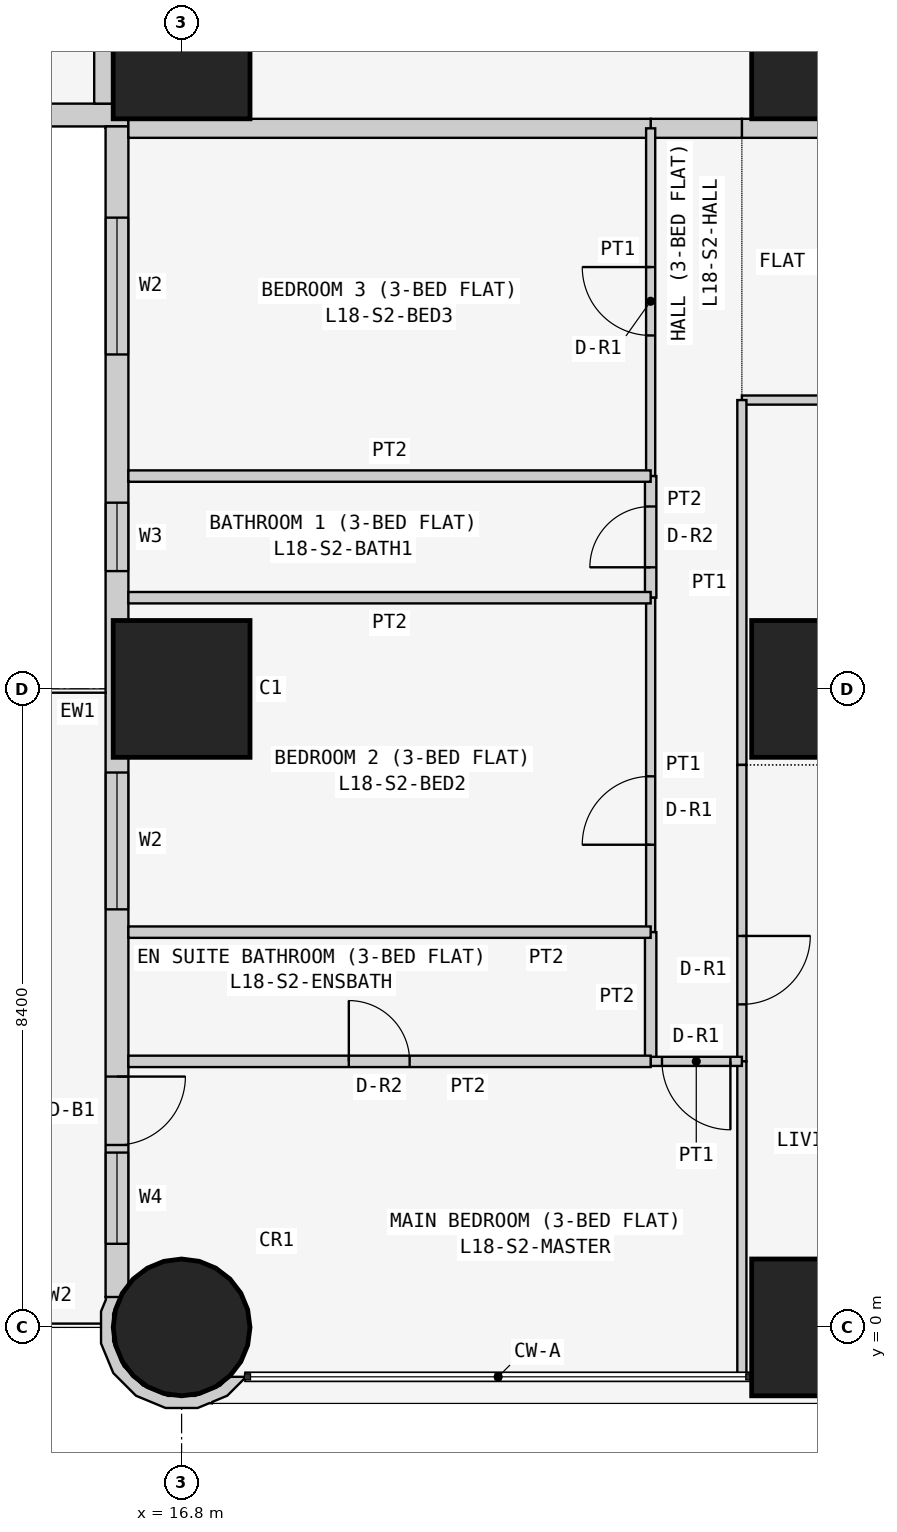
"""IFC4 building model, lengths in metres.
Left out: names, types, materials, properties, quantities, classifications, styles, units other than length and angle.
Written with IfcOpenShell. Run it as: python <this file> out.ifc"""

import sys

from ifc_helpers import new_model, si_unit, direction, frame, frame_2d, origin, origin_2d, place, context, subcontext, project, spatial, polyline, rectangle, circle, outline, extrude, element, fill, save


model = new_model("IFC4")
c1 = context("Model", 3, precision=1e-05, world=origin(), true_north=direction((0.0, 1.0)))
c2 = subcontext(c1, "Body", "Model", "MODEL_VIEW")
j1 = project(units=[si_unit("LENGTHUNIT", "METRE"), si_unit("PLANEANGLEUNIT", "RADIAN")], contexts=[c1])
p1 = place(None, origin())
s1 = spatial("IfcSite", under=j1, at=p1, CompositionType="ELEMENT")
p2 = place(p1, origin())
s2 = spatial("IfcBuilding", under=s1, at=p2, CompositionType="ELEMENT")
p3 = place(p2, frame((0.0, 0.0, 74.1)))
s3 = spatial("IfcBuildingStorey", under=s2, at=p3, CompositionType="ELEMENT", Elevation=74.1)
p4 = place(p3, frame((16.8, 0.0, 0.0), z_axis=(0.0, 0.0, 1.0), x_axis=(1.0, 0.0, 0.0)))
e1 = element("IfcColumn", 1, at=p4, inside=s3, PredefinedType="COLUMN", context=c2, shape_type="SweptSolid", body=[
    extrude(circle(Radius=0.9, at=origin_2d()), origin(), (0.0, 0.0, 1.0), 3.6),
])
for number, where, z_axis, x_axis in (
    (2, (16.8, 8.4, 0.0), (0.0, 0.0, 1.0), (1.0, 0.0, 0.0)),
    (3, (16.8, 16.8, 0.0), (0.0, 0.0, 1.0), (1.0, 0.0, 0.0)),
    (4, (25.2, 0.0, 0.0), (0.0, 0.0, 1.0), (1.0, 0.0, 0.0)),
    (5, (25.2, 8.4, 0.0), (0.0, 0.0, 1.0), (1.0, 0.0, 0.0)),
    (6, (25.2, 16.8, 0.0), (0.0, 0.0, 1.0), (1.0, 0.0, 0.0)),
):
    element("IfcColumn", number, at=place(p3, frame(where, z_axis=z_axis, x_axis=x_axis)), inside=s3, PredefinedType="COLUMN", context=c2, shape_type="SweptSolid", body=[
        extrude(rectangle(XDim=1.8, YDim=1.8, at=origin_2d()), origin(), (0.0, 0.0, 1.0), 3.6),
    ])
p5 = place(p3, frame((0.4, 15.95, 0.0), z_axis=(0.0, 0.0, 1.0), x_axis=(1.0, 0.0, 0.0)))
e7 = element("IfcWall", 7, at=p5, inside=s3, PredefinedType="SOLIDWALL", context=c2, shape_type="SweptSolid", body=[
    extrude(rectangle(XDim=15.7, YDim=0.3, at=frame_2d((7.85, 0.0))), origin(), (0.0, 0.0, 1.0), 3.45),
])
p6 = place(p5, frame((12.4, 0.0, 0.9)))
e8 = element("IfcOpeningElement", 8, at=p6, cuts=e7, PredefinedType="OPENING", context=c2, shape_type="SweptSolid", body=[
    extrude(rectangle(XDim=1.8, YDim=1.5, at=frame_2d((0.9, 0.75))), frame((0.0, 0.16, 0.0), z_axis=(0.0, -1.0, 0.0), x_axis=(1.0, 0.0, 0.0)), (0.0, 0.0, 1.0), 0.32),
])
p7 = place(p5, frame((9.55, 0.0, 1.5)))
e9 = element("IfcOpeningElement", 9, at=p7, cuts=e7, PredefinedType="OPENING", context=c2, shape_type="SweptSolid", body=[
    extrude(rectangle(XDim=0.9, YDim=0.7, at=frame_2d((0.45, 0.35))), frame((0.0, 0.16, 0.0), z_axis=(0.0, -1.0, 0.0), x_axis=(1.0, 0.0, 0.0)), (0.0, 0.0, 1.0), 0.32),
])
p8 = place(p5, frame((5.1, 0.0, 0.9)))
e10 = element("IfcOpeningElement", 10, at=p8, cuts=e7, PredefinedType="OPENING", context=c2, shape_type="SweptSolid", body=[
    extrude(rectangle(XDim=1.8, YDim=1.5, at=frame_2d((0.9, 0.75))), frame((0.0, 0.16, 0.0), z_axis=(0.0, -1.0, 0.0), x_axis=(1.0, 0.0, 0.0)), (0.0, 0.0, 1.0), 0.32),
])
p9 = place(p5, frame((2.0, 0.0, 0.0)))
e11 = element("IfcOpeningElement", 11, at=p9, cuts=e7, PredefinedType="OPENING", context=c2, shape_type="SweptSolid", body=[
    extrude(rectangle(XDim=0.9, YDim=2.4, at=frame_2d((0.45, 1.2))), frame((0.0, 0.16, 0.0), z_axis=(0.0, -1.0, 0.0), x_axis=(1.0, 0.0, 0.0)), (0.0, 0.0, 1.0), 0.32),
])
p10 = place(p5, frame((0.7, 0.0, 0.9)))
e12 = element("IfcOpeningElement", 12, at=p10, cuts=e7, PredefinedType="OPENING", context=c2, shape_type="SweptSolid", body=[
    extrude(rectangle(XDim=1.2, YDim=1.5, at=frame_2d((0.6, 0.75))), frame((0.0, 0.16, 0.0), z_axis=(0.0, -1.0, 0.0), x_axis=(1.0, 0.0, 0.0)), (0.0, 0.0, 1.0), 0.32),
])
p11 = place(p3, frame((15.95, 15.8, 0.0), z_axis=(0.0, 0.0, 1.0), x_axis=(0.0, -1.0, 0.0)))
e13 = element("IfcWall", 13, at=p11, inside=s3, PredefinedType="SOLIDWALL", context=c2, shape_type="SweptSolid", body=[
    extrude(rectangle(XDim=15.4, YDim=0.3, at=frame_2d((7.7, 0.0))), origin(), (0.0, 0.0, 1.0), 3.45),
])
p12 = place(p11, frame((1.2, 0.0, 0.9)))
e14 = element("IfcOpeningElement", 14, at=p12, cuts=e13, PredefinedType="OPENING", context=c2, shape_type="SweptSolid", body=[
    extrude(rectangle(XDim=1.8, YDim=1.5, at=frame_2d((0.9, 0.75))), frame((0.0, 0.16, 0.0), z_axis=(0.0, -1.0, 0.0), x_axis=(1.0, 0.0, 0.0)), (0.0, 0.0, 1.0), 0.32),
])
p13 = place(p11, frame((4.95, 0.0, 1.5)))
e15 = element("IfcOpeningElement", 15, at=p13, cuts=e13, PredefinedType="OPENING", context=c2, shape_type="SweptSolid", body=[
    extrude(rectangle(XDim=0.9, YDim=0.7, at=frame_2d((0.45, 0.35))), frame((0.0, 0.16, 0.0), z_axis=(0.0, -1.0, 0.0), x_axis=(1.0, 0.0, 0.0)), (0.0, 0.0, 1.0), 0.32),
])
p14 = place(p11, frame((8.5, 0.0, 0.9)))
e16 = element("IfcOpeningElement", 16, at=p14, cuts=e13, PredefinedType="OPENING", context=c2, shape_type="SweptSolid", body=[
    extrude(rectangle(XDim=1.8, YDim=1.5, at=frame_2d((0.9, 0.75))), frame((0.0, 0.16, 0.0), z_axis=(0.0, -1.0, 0.0), x_axis=(1.0, 0.0, 0.0)), (0.0, 0.0, 1.0), 0.32),
])
p15 = place(p11, frame((12.5, 0.0, 0.0)))
e17 = element("IfcOpeningElement", 17, at=p15, cuts=e13, PredefinedType="OPENING", context=c2, shape_type="SweptSolid", body=[
    extrude(rectangle(XDim=0.9, YDim=2.4, at=frame_2d((0.45, 1.2))), frame((0.0, 0.16, 0.0), z_axis=(0.0, -1.0, 0.0), x_axis=(1.0, 0.0, 0.0)), (0.0, 0.0, 1.0), 0.32),
])
p16 = place(p11, frame((13.5, 0.0, 0.9)))
e18 = element("IfcOpeningElement", 18, at=p16, cuts=e13, PredefinedType="OPENING", context=c2, shape_type="SweptSolid", body=[
    extrude(rectangle(XDim=1.2, YDim=1.5, at=frame_2d((0.6, 0.75))), frame((0.0, 0.16, 0.0), z_axis=(0.0, -1.0, 0.0), x_axis=(1.0, 0.0, 0.0)), (0.0, 0.0, 1.0), 0.32),
])
p17 = place(p3, frame((15.89, 0.364, 0.0), z_axis=(0.0, 0.0, 1.0), x_axis=(-0.377204953059, -0.926129809145, 0.0)))
e19 = element("IfcWall", 19, at=p17, inside=s3, PredefinedType="SOLIDWALL", context=c2, shape_type="SweptSolid", body=[
    extrude(outline(polyline([(0.36, 1.803), (0.509, 1.741), (0.761, 1.486), (0.896, 1.154), (0.894, 0.795), (0.755, 0.465), (0.5, 0.213), (0.168, 0.078), (-0.1, 0.08), (0.001, -0.097), (0.03, -0.08), (0.199, -0.081), (0.589, 0.078), (0.889, 0.374), (1.053, 0.763), (1.055, 1.185), (0.896, 1.575), (0.778, 1.695), (0.769, 1.728), (0.75, 1.723), (0.6, 1.875), (0.295, 2.004), (0.281, 1.998), (0.36, 1.803)])), origin(), (0.0, 0.0, 1.0), 3.45),
])
p18 = place(p3, frame((29.4, 15.775, 0.0), z_axis=(0.0, 0.0, 1.0), x_axis=(-1.0, 0.0, 0.0)))
e20 = element("IfcWall", 20, at=p18, inside=s3, PredefinedType="PARTITIONING", context=c2, shape_type="SweptSolid", body=[
    extrude(rectangle(XDim=5.229, YDim=0.25, at=frame_2d((2.615, 0.0))), origin(), (0.0, 0.0, 1.0), 3.45),
])
p19 = place(p18, frame((2.1, 0.0, 0.0)))
e21 = element("IfcOpeningElement", 21, at=p19, cuts=e20, PredefinedType="OPENING", context=c2, shape_type="SweptSolid", body=[
    extrude(rectangle(XDim=1.0, YDim=2.1, at=frame_2d((0.5, 1.05))), frame((0.0, 0.135, 0.0), z_axis=(0.0, -1.0, 0.0), x_axis=(1.0, 0.0, 0.0)), (0.0, 0.0, 1.0), 0.27),
])
p20 = place(p3, frame((24.171, 15.775, 0.0), z_axis=(0.0, 0.0, 1.0), x_axis=(-1.0, 0.0, 0.0)))
e22 = element("IfcWall", 22, at=p20, inside=s3, PredefinedType="PARTITIONING", context=c2, shape_type="SweptSolid", body=[
    extrude(rectangle(XDim=1.2, YDim=0.25, at=frame_2d((0.6, 0.0))), origin(), (0.0, 0.0, 1.0), 3.45),
])
p21 = place(p3, frame((22.971, 15.775, 0.0), z_axis=(0.0, 0.0, 1.0), x_axis=(-1.0, 0.0, 0.0)))
e23 = element("IfcWall", 23, at=p21, inside=s3, PredefinedType="PARTITIONING", context=c2, shape_type="SweptSolid", body=[
    extrude(rectangle(XDim=6.871, YDim=0.25, at=frame_2d((3.436, 0.0))), origin(), (0.0, 0.0, 1.0), 3.45),
])
p22 = place(p3, frame((15.775, 16.1, 0.0), z_axis=(0.0, 0.0, 1.0), x_axis=(0.0, 1.0, 0.0)))
e24 = element("IfcWall", 24, at=p22, inside=s3, PredefinedType="PARTITIONING", context=c2, shape_type="SweptSolid", body=[
    extrude(rectangle(XDim=6.471, YDim=0.25, at=frame_2d((3.235, 0.0))), origin(), (0.0, 0.0, 1.0), 3.45),
])
p23 = place(p3, frame((29.4, 12.2, 0.0), z_axis=(0.0, 0.0, 1.0), x_axis=(-1.0, 0.0, 0.0)))
e25 = element("IfcWall", 25, at=p23, inside=s3, PredefinedType="PARTITIONING", context=c2, shape_type="SweptSolid", body=[
    extrude(rectangle(XDim=5.229, YDim=0.12, at=frame_2d((2.615, 0.0))), origin(), (0.0, 0.0, 1.0), 3.45),
])
p24 = place(p23, frame((1.05, 0.0, 0.0)))
e26 = element("IfcOpeningElement", 26, at=p24, cuts=e25, PredefinedType="OPENING", context=c2, shape_type="SweptSolid", body=[
    extrude(rectangle(XDim=0.9, YDim=2.1, at=frame_2d((0.45, 1.05))), frame((0.0, 0.07, 0.0), z_axis=(0.0, -1.0, 0.0), x_axis=(1.0, 0.0, 0.0)), (0.0, 0.0, 1.0), 0.14),
])
p25 = place(p3, frame((24.171, 7.4, 0.0), z_axis=(0.0, 0.0, 1.0), x_axis=(0.0, 1.0, 0.0)))
e27 = element("IfcWall", 27, at=p25, inside=s3, PredefinedType="PARTITIONING", context=c2, shape_type="SweptSolid", body=[
    extrude(rectangle(XDim=4.8, YDim=0.12, at=frame_2d((2.4, 0.0))), origin(), (0.0, 0.0, 1.0), 3.45),
])
p26 = place(p3, frame((24.171, 3.5, 0.0), z_axis=(0.0, 0.0, 1.0), x_axis=(0.0, 1.0, 0.0)))
e28 = element("IfcWall", 28, at=p26, inside=s3, PredefinedType="PARTITIONING", context=c2, shape_type="SweptSolid", body=[
    extrude(rectangle(XDim=3.9, YDim=0.12, at=frame_2d((1.95, 0.0))), origin(), (0.0, 0.0, 1.0), 3.45),
])
p27 = place(p26, frame((0.75, 0.0, 0.0)))
e29 = element("IfcOpeningElement", 29, at=p27, cuts=e28, PredefinedType="OPENING", context=c2, shape_type="SweptSolid", body=[
    extrude(rectangle(XDim=0.9, YDim=2.1, at=frame_2d((0.45, 1.05))), frame((0.0, 0.07, 0.0), z_axis=(0.0, -1.0, 0.0), x_axis=(1.0, 0.0, 0.0)), (0.0, 0.0, 1.0), 0.14),
])
p28 = place(p3, frame((24.171, -0.65, 0.0), z_axis=(0.0, 0.0, 1.0), x_axis=(0.0, 1.0, 0.0)))
e30 = element("IfcWall", 30, at=p28, inside=s3, PredefinedType="PARTITIONING", context=c2, shape_type="SweptSolid", body=[
    extrude(rectangle(XDim=4.15, YDim=0.12, at=frame_2d((2.075, 0.0))), origin(), (0.0, 0.0, 1.0), 3.45),
])
p29 = place(p3, frame((22.971, 11.2, 0.0), z_axis=(0.0, 0.0, 1.0), x_axis=(0.0, 1.0, 0.0)))
e31 = element("IfcWall", 31, at=p29, inside=s3, PredefinedType="PARTITIONING", context=c2, shape_type="SweptSolid", body=[
    extrude(rectangle(XDim=4.575, YDim=0.12, at=frame_2d((2.288, 0.0))), origin(), (0.0, 0.0, 1.0), 3.45),
])
p30 = place(p29, frame((1.85, 0.0, 0.0)))
e32 = element("IfcOpeningElement", 32, at=p30, cuts=e31, PredefinedType="OPENING", context=c2, shape_type="SweptSolid", body=[
    extrude(rectangle(XDim=0.9, YDim=2.1, at=frame_2d((0.45, 1.05))), frame((0.0, 0.07, 0.0), z_axis=(0.0, -1.0, 0.0), x_axis=(1.0, 0.0, 0.0)), (0.0, 0.0, 1.0), 0.14),
])
p31 = place(p3, frame((22.971, 9.6, 0.0), z_axis=(0.0, 0.0, 1.0), x_axis=(0.0, 1.0, 0.0)))
e33 = element("IfcWall", 33, at=p31, inside=s3, PredefinedType="PARTITIONING", context=c2, shape_type="SweptSolid", body=[
    extrude(rectangle(XDim=1.6, YDim=0.15, at=frame_2d((0.8, 0.0))), origin(), (0.0, 0.0, 1.0), 3.45),
])
p32 = place(p31, frame((0.4, 0.0, 0.0)))
e34 = element("IfcOpeningElement", 34, at=p32, cuts=e33, PredefinedType="OPENING", context=c2, shape_type="SweptSolid", body=[
    extrude(rectangle(XDim=0.8, YDim=2.1, at=frame_2d((0.4, 1.05))), frame((0.0, 0.085, 0.0), z_axis=(0.0, -1.0, 0.0), x_axis=(1.0, 0.0, 0.0)), (0.0, 0.0, 1.0), 0.17),
])
p33 = place(p3, frame((22.971, 5.2, 0.0), z_axis=(0.0, 0.0, 1.0), x_axis=(0.0, 1.0, 0.0)))
e35 = element("IfcWall", 35, at=p33, inside=s3, PredefinedType="PARTITIONING", context=c2, shape_type="SweptSolid", body=[
    extrude(rectangle(XDim=4.4, YDim=0.12, at=frame_2d((2.2, 0.0))), origin(), (0.0, 0.0, 1.0), 3.45),
])
p34 = place(p33, frame((1.15, 0.0, 0.0)))
e36 = element("IfcOpeningElement", 36, at=p34, cuts=e35, PredefinedType="OPENING", context=c2, shape_type="SweptSolid", body=[
    extrude(rectangle(XDim=0.9, YDim=2.1, at=frame_2d((0.45, 1.05))), frame((0.0, 0.07, 0.0), z_axis=(0.0, -1.0, 0.0), x_axis=(1.0, 0.0, 0.0)), (0.0, 0.0, 1.0), 0.14),
])
p35 = place(p3, frame((22.971, 3.5, 0.0), z_axis=(0.0, 0.0, 1.0), x_axis=(0.0, 1.0, 0.0)))
e37 = element("IfcWall", 37, at=p35, inside=s3, PredefinedType="PARTITIONING", context=c2, shape_type="SweptSolid", body=[
    extrude(rectangle(XDim=1.7, YDim=0.15, at=frame_2d((0.85, 0.0))), origin(), (0.0, 0.0, 1.0), 3.45),
])
p36 = place(p3, frame((24.171, 3.5, 0.0), z_axis=(0.0, 0.0, 1.0), x_axis=(-1.0, 0.0, 0.0)))
e38 = element("IfcWall", 38, at=p36, inside=s3, PredefinedType="PARTITIONING", context=c2, shape_type="SweptSolid", body=[
    extrude(rectangle(XDim=1.2, YDim=0.12, at=frame_2d((0.6, 0.0))), origin(), (0.0, 0.0, 1.0), 3.45),
])
p37 = place(p36, frame((0.151, 0.0, 0.0)))
e39 = element("IfcOpeningElement", 39, at=p37, cuts=e38, PredefinedType="OPENING", context=c2, shape_type="SweptSolid", body=[
    extrude(rectangle(XDim=0.9, YDim=2.1, at=frame_2d((0.45, 1.05))), frame((0.0, 0.07, 0.0), z_axis=(0.0, -1.0, 0.0), x_axis=(1.0, 0.0, 0.0)), (0.0, 0.0, 1.0), 0.14),
])
for number, where, z_axis, x_axis in (
    (40, (22.971, 11.2, 0.0), (0.0, 0.0, 1.0), (-1.0, 0.0, 0.0)),
    (41, (22.971, 9.6, 0.0), (0.0, 0.0, 1.0), (-1.0, 0.0, 0.0)),
    (42, (22.971, 5.2, 0.0), (0.0, 0.0, 1.0), (-1.0, 0.0, 0.0)),
):
    element("IfcWall", number, at=place(p3, frame(where, z_axis=z_axis, x_axis=x_axis)), inside=s3, PredefinedType="PARTITIONING", context=c2, shape_type="SweptSolid", body=[
        extrude(rectangle(XDim=6.871, YDim=0.15, at=frame_2d((3.436, 0.0))), origin(), (0.0, 0.0, 1.0), 3.45),
    ])
p38 = place(p3, frame((22.971, 3.5, 0.0), z_axis=(0.0, 0.0, 1.0), x_axis=(-1.0, 0.0, 0.0)))
e43 = element("IfcWall", 43, at=p38, inside=s3, PredefinedType="PARTITIONING", context=c2, shape_type="SweptSolid", body=[
    extrude(rectangle(XDim=6.871, YDim=0.15, at=frame_2d((3.436, 0.0))), origin(), (0.0, 0.0, 1.0), 3.45),
])
p39 = place(p38, frame((3.171, 0.0, 0.0)))
e44 = element("IfcOpeningElement", 44, at=p39, cuts=e43, PredefinedType="OPENING", context=c2, shape_type="SweptSolid", body=[
    extrude(rectangle(XDim=0.8, YDim=2.1, at=frame_2d((0.4, 1.05))), frame((0.0, 0.085, 0.0), z_axis=(0.0, -1.0, 0.0), x_axis=(1.0, 0.0, 0.0)), (0.0, 0.0, 1.0), 0.17),
])
p40 = place(p12, origin())
e45 = element("IfcWindow", 45, at=p40, inside=s3, PartitioningType="SINGLE_PANEL", PredefinedType="WINDOW", context=c2, shape_type="SweptSolid", body=[
    extrude(rectangle(XDim=1.8, YDim=1.5, at=frame_2d((0.9, 0.75))), frame((0.0, 0.03, 0.0), z_axis=(0.0, -1.0, 0.0), x_axis=(1.0, 0.0, 0.0)), (0.0, 0.0, 1.0), 0.06),
])
fill(e14, e45)
p41 = place(p13, origin())
e46 = element("IfcWindow", 46, at=p41, inside=s3, PartitioningType="SINGLE_PANEL", PredefinedType="WINDOW", context=c2, shape_type="SweptSolid", body=[
    extrude(rectangle(XDim=0.9, YDim=0.7, at=frame_2d((0.45, 0.35))), frame((0.0, 0.03, 0.0), z_axis=(0.0, -1.0, 0.0), x_axis=(1.0, 0.0, 0.0)), (0.0, 0.0, 1.0), 0.06),
])
fill(e15, e46)
p42 = place(p14, origin())
e47 = element("IfcWindow", 47, at=p42, inside=s3, PartitioningType="SINGLE_PANEL", PredefinedType="WINDOW", context=c2, shape_type="SweptSolid", body=[
    extrude(rectangle(XDim=1.8, YDim=1.5, at=frame_2d((0.9, 0.75))), frame((0.0, 0.03, 0.0), z_axis=(0.0, -1.0, 0.0), x_axis=(1.0, 0.0, 0.0)), (0.0, 0.0, 1.0), 0.06),
])
fill(e16, e47)
p43 = place(p15, origin())
e48 = element("IfcDoor", 48, at=p43, inside=s3, OperationType="SINGLE_SWING_LEFT", PredefinedType="DOOR", context=c2, shape_type="SweptSolid", body=[
    extrude(rectangle(XDim=0.9, YDim=2.4, at=frame_2d((0.45, 1.2))), frame((0.0, 0.025, 0.0), z_axis=(0.0, -1.0, 0.0), x_axis=(1.0, 0.0, 0.0)), (0.0, 0.0, 1.0), 0.05),
])
fill(e17, e48)
p44 = place(p16, origin())
e49 = element("IfcWindow", 49, at=p44, inside=s3, PartitioningType="SINGLE_PANEL", PredefinedType="WINDOW", context=c2, shape_type="SweptSolid", body=[
    extrude(rectangle(XDim=1.2, YDim=1.5, at=frame_2d((0.6, 0.75))), frame((0.0, 0.03, 0.0), z_axis=(0.0, -1.0, 0.0), x_axis=(1.0, 0.0, 0.0)), (0.0, 0.0, 1.0), 0.06),
])
fill(e18, e49)
p45 = place(p27, frame((0.9, 0.0, 0.0), z_axis=(0.0, 0.0, 1.0), x_axis=(-1.0, 0.0, 0.0)))
e50 = element("IfcDoor", 50, at=p45, inside=s3, OperationType="SINGLE_SWING_LEFT", PredefinedType="DOOR", context=c2, shape_type="SweptSolid", body=[
    extrude(rectangle(XDim=0.9, YDim=2.1, at=frame_2d((0.45, 1.05))), frame((0.0, 0.025, 0.0), z_axis=(0.0, -1.0, 0.0), x_axis=(1.0, 0.0, 0.0)), (0.0, 0.0, 1.0), 0.05),
])
fill(e29, e50)
p46 = place(p30, origin())
e51 = element("IfcDoor", 51, at=p46, inside=s3, OperationType="SINGLE_SWING_RIGHT", PredefinedType="DOOR", context=c2, shape_type="SweptSolid", body=[
    extrude(rectangle(XDim=0.9, YDim=2.1, at=frame_2d((0.45, 1.05))), frame((0.0, 0.025, 0.0), z_axis=(0.0, -1.0, 0.0), x_axis=(1.0, 0.0, 0.0)), (0.0, 0.0, 1.0), 0.05),
])
fill(e32, e51)
p47 = place(p32, origin())
e52 = element("IfcDoor", 52, at=p47, inside=s3, OperationType="SINGLE_SWING_LEFT", PredefinedType="DOOR", context=c2, shape_type="SweptSolid", body=[
    extrude(rectangle(XDim=0.8, YDim=2.1, at=frame_2d((0.4, 1.05))), frame((0.0, 0.025, 0.0), z_axis=(0.0, -1.0, 0.0), x_axis=(1.0, 0.0, 0.0)), (0.0, 0.0, 1.0), 0.05),
])
fill(e34, e52)
p48 = place(p34, origin())
e53 = element("IfcDoor", 53, at=p48, inside=s3, OperationType="SINGLE_SWING_LEFT", PredefinedType="DOOR", context=c2, shape_type="SweptSolid", body=[
    extrude(rectangle(XDim=0.9, YDim=2.1, at=frame_2d((0.45, 1.05))), frame((0.0, 0.025, 0.0), z_axis=(0.0, -1.0, 0.0), x_axis=(1.0, 0.0, 0.0)), (0.0, 0.0, 1.0), 0.05),
])
fill(e36, e53)
p49 = place(p37, origin())
e54 = element("IfcDoor", 54, at=p49, inside=s3, OperationType="SINGLE_SWING_LEFT", PredefinedType="DOOR", context=c2, shape_type="SweptSolid", body=[
    extrude(rectangle(XDim=0.9, YDim=2.1, at=frame_2d((0.45, 1.05))), frame((0.0, 0.025, 0.0), z_axis=(0.0, -1.0, 0.0), x_axis=(1.0, 0.0, 0.0)), (0.0, 0.0, 1.0), 0.05),
])
fill(e39, e54)
p50 = place(p39, frame((0.8, 0.0, 0.0), z_axis=(0.0, 0.0, 1.0), x_axis=(-1.0, 0.0, 0.0)))
e55 = element("IfcDoor", 55, at=p50, inside=s3, OperationType="SINGLE_SWING_LEFT", PredefinedType="DOOR", context=c2, shape_type="SweptSolid", body=[
    extrude(rectangle(XDim=0.8, YDim=2.1, at=frame_2d((0.4, 1.05))), frame((0.0, 0.025, 0.0), z_axis=(0.0, -1.0, 0.0), x_axis=(1.0, 0.0, 0.0)), (0.0, 0.0, 1.0), 0.05),
])
fill(e44, e55)
save(model, sys.argv[1])
